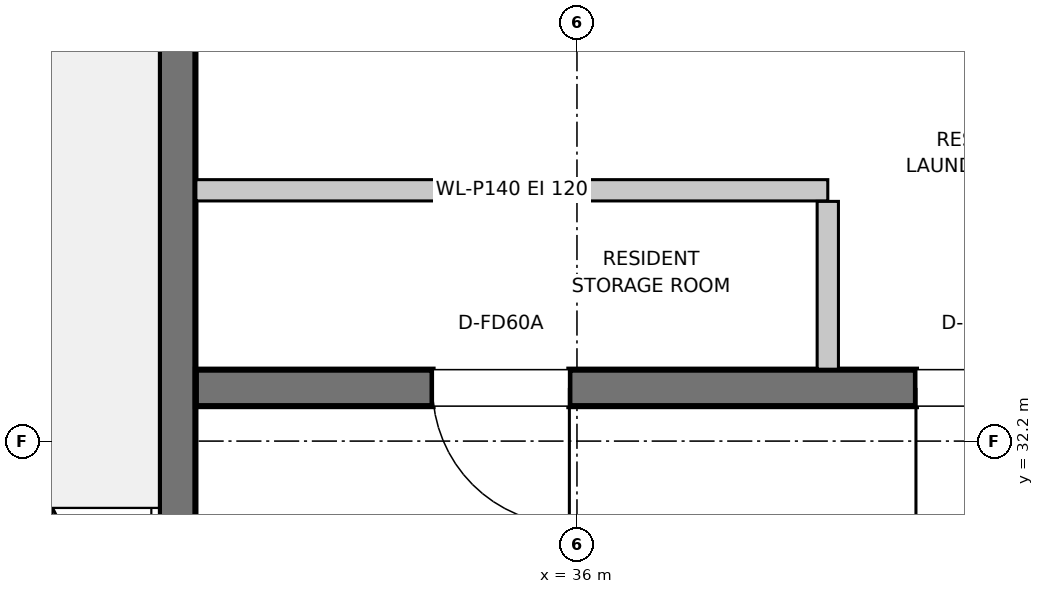
"""IFC4 building model, lengths in metres.
Left out: names, types, materials, properties, quantities, classifications, styles, units other than length and angle.
Written with IfcOpenShell. Run it as: python <this file> out.ifc"""

import sys

from ifc_helpers import new_model, si_unit, direction, frame, frame_2d, origin, place, context, subcontext, project, spatial, rectangle, extrude, element, fill, save


model = new_model("IFC4")
c1 = context("Model", 3, precision=1e-05, world=origin(), true_north=direction((0.0, 1.0)))
c2 = subcontext(c1, "Body", "Model", "MODEL_VIEW")
j1 = project(units=[si_unit("LENGTHUNIT", "METRE"), si_unit("PLANEANGLEUNIT", "RADIAN")], contexts=[c1])
p1 = place(None, origin())
s1 = spatial("IfcSite", under=j1, at=p1, CompositionType="ELEMENT")
p2 = place(p1, origin())
s2 = spatial("IfcBuilding", under=s1, at=p2, CompositionType="ELEMENT")
p3 = place(p2, frame((0.0, 0.0, 291.5)))
s3 = spatial("IfcBuildingStorey", under=s2, at=p3, CompositionType="ELEMENT", Elevation=291.5)
p4 = place(p3, frame((33.37, 26.953, 0.0), z_axis=(0.0, 0.0, 1.0), x_axis=(0.0, 1.0, 0.0)))
e1 = element("IfcWall", 1, at=p4, inside=s3, PredefinedType="SHEAR", context=c2, shape_type="SweptSolid", body=[
    extrude(rectangle(XDim=8.394, YDim=0.24, at=frame_2d((4.197, 0.0))), origin(), (0.0, 0.0, 1.0), 4.5),
])
p5 = place(p3, frame((33.493, 32.55, 0.0), z_axis=(0.0, 0.0, 1.0), x_axis=(1.0, 0.0, 0.0)))
e2 = element("IfcWall", 2, at=p5, inside=s3, PredefinedType="SHEAR", context=c2, shape_type="SweptSolid", body=[
    extrude(rectangle(XDim=13.214, YDim=0.24, at=frame_2d((6.607, 0.0))), origin(), (0.0, 0.0, 1.0), 4.5),
])
p6 = place(p5, frame((1.557, 0.0, 0.0)))
e3 = element("IfcOpeningElement", 3, at=p6, cuts=e2, PredefinedType="OPENING", context=c2, shape_type="SweptSolid", body=[
    extrude(rectangle(XDim=0.9, YDim=2.0, at=frame_2d((0.45, 1.0))), frame((0.0, 0.13, 0.0), z_axis=(0.0, -1.0, 0.0), x_axis=(1.0, 0.0, 0.0)), (0.0, 0.0, 1.0), 0.26),
])
p7 = place(p5, frame((4.737, 0.0, 0.0)))
e4 = element("IfcOpeningElement", 4, at=p7, cuts=e2, PredefinedType="OPENING", context=c2, shape_type="SweptSolid", body=[
    extrude(rectangle(XDim=0.9, YDim=2.0, at=frame_2d((0.45, 1.0))), frame((0.0, 0.13, 0.0), z_axis=(0.0, -1.0, 0.0), x_axis=(1.0, 0.0, 0.0)), (0.0, 0.0, 1.0), 0.26),
])
p8 = place(p5, frame((7.497, 0.0, 0.0)))
e5 = element("IfcOpeningElement", 5, at=p8, cuts=e2, PredefinedType="OPENING", context=c2, shape_type="SweptSolid", body=[
    extrude(rectangle(XDim=1.12, YDim=2.0, at=frame_2d((0.56, 1.0))), frame((0.0, 0.13, 0.0), z_axis=(0.0, -1.0, 0.0), x_axis=(1.0, 0.0, 0.0)), (0.0, 0.0, 1.0), 0.26),
])
p9 = place(p5, frame((9.597, 0.0, 0.0)))
e6 = element("IfcOpeningElement", 6, at=p9, cuts=e2, PredefinedType="OPENING", context=c2, shape_type="SweptSolid", body=[
    extrude(rectangle(XDim=1.12, YDim=2.0, at=frame_2d((0.56, 1.0))), frame((0.0, 0.13, 0.0), z_axis=(0.0, -1.0, 0.0), x_axis=(1.0, 0.0, 0.0)), (0.0, 0.0, 1.0), 0.26),
])
p10 = place(p5, frame((11.697, 0.0, 0.0)))
e7 = element("IfcOpeningElement", 7, at=p10, cuts=e2, PredefinedType="OPENING", context=c2, shape_type="SweptSolid", body=[
    extrude(rectangle(XDim=1.12, YDim=2.0, at=frame_2d((0.56, 1.0))), frame((0.0, 0.13, 0.0), z_axis=(0.0, -1.0, 0.0), x_axis=(1.0, 0.0, 0.0)), (0.0, 0.0, 1.0), 0.26),
])
p11 = place(p3, frame((33.493, 33.85, 0.0), z_axis=(0.0, 0.0, 1.0), x_axis=(1.0, 0.0, 0.0)))
e8 = element("IfcWall", 8, at=p11, inside=s3, PredefinedType="PARTITIONING", context=c2, shape_type="SweptSolid", body=[
    extrude(rectangle(XDim=4.157, YDim=0.14, at=frame_2d((2.079, 0.0))), origin(), (0.0, 0.0, 1.0), 4.205),
])
p12 = place(p3, frame((37.65, 32.673, 0.0), z_axis=(0.0, 0.0, 1.0), x_axis=(0.0, 1.0, 0.0)))
e9 = element("IfcWall", 9, at=p12, inside=s3, PredefinedType="PARTITIONING", context=c2, shape_type="SweptSolid", body=[
    extrude(rectangle(XDim=1.104, YDim=0.14, at=frame_2d((0.552, 0.0))), origin(), (0.0, 0.0, 1.0), 4.205),
])
p13 = place(p6, frame((0.9, 0.0, 0.0), z_axis=(0.0, 0.0, 1.0), x_axis=(-1.0, 0.0, 0.0)))
e10 = element("IfcDoor", 10, at=p13, inside=s3, OperationType="SINGLE_SWING_LEFT", PredefinedType="DOOR", context=c2, shape_type="SweptSolid", body=[
    extrude(rectangle(XDim=0.9, YDim=2.0, at=frame_2d((0.45, 1.0))), frame((0.0, 0.025, 0.0), z_axis=(0.0, -1.0, 0.0), x_axis=(1.0, 0.0, 0.0)), (0.0, 0.0, 1.0), 0.05),
])
fill(e3, e10)
p14 = place(p7, frame((0.9, 0.0, 0.0), z_axis=(0.0, 0.0, 1.0), x_axis=(-1.0, 0.0, 0.0)))
e11 = element("IfcDoor", 11, at=p14, inside=s3, OperationType="SINGLE_SWING_RIGHT", PredefinedType="DOOR", context=c2, shape_type="SweptSolid", body=[
    extrude(rectangle(XDim=0.9, YDim=2.0, at=frame_2d((0.45, 1.0))), frame((0.0, 0.025, 0.0), z_axis=(0.0, -1.0, 0.0), x_axis=(1.0, 0.0, 0.0)), (0.0, 0.0, 1.0), 0.05),
])
fill(e4, e11)
save(model, sys.argv[1])
